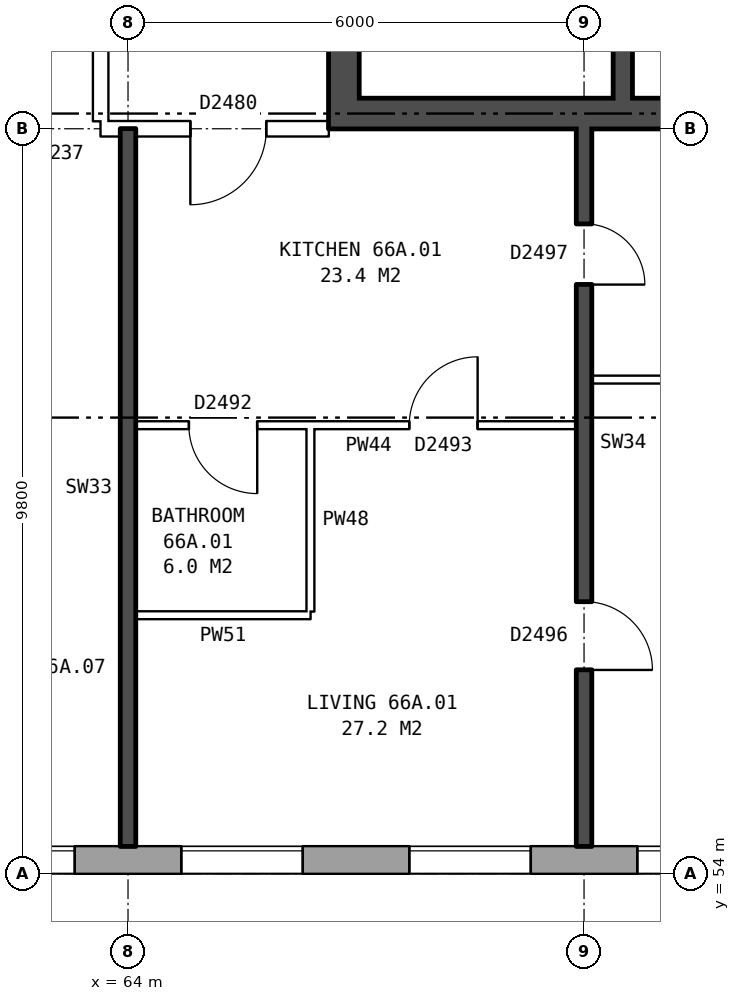
"""IFC4 building model, lengths in metres.
Left out: names, types, materials, properties, quantities, classifications, styles, units other than length and angle.
Written with IfcOpenShell. Run it as: python <this file> out.ifc"""

import sys

from ifc_helpers import new_model, si_unit, direction, frame, frame_2d, origin, place, context, subcontext, project, spatial, rectangle, extrude, element, fill, save


model = new_model("IFC4")
c1 = context("Model", 3, precision=1e-05, world=origin(), true_north=direction((0.0, 1.0)))
c2 = subcontext(c1, "Body", "Model", "MODEL_VIEW")
j1 = project(units=[si_unit("LENGTHUNIT", "METRE"), si_unit("PLANEANGLEUNIT", "RADIAN")], contexts=[c1])
p1 = place(None, origin())
s1 = spatial("IfcSite", under=j1, at=p1, CompositionType="ELEMENT")
p2 = place(p1, origin())
s2 = spatial("IfcBuilding", under=s1, at=p2, CompositionType="ELEMENT")
p3 = place(p2, frame((0.0, 0.0, 233.8)))
s3 = spatial("IfcBuildingStorey", under=s2, at=p3, CompositionType="ELEMENT", Elevation=233.8)
p4 = place(p3, frame((35.075, 54.18, 0.0), z_axis=(0.0, 0.0, 1.0), x_axis=(1.0, 0.0, 0.0)))
e1 = element("IfcWall", 1, at=p4, inside=s3, PredefinedType="STANDARD", context=c2, shape_type="SweptSolid", body=[
    extrude(rectangle(XDim=39.875, YDim=0.36, at=frame_2d((19.938, 0.0))), origin(), (0.0, 0.0, 1.0), 2.85),
])
p5 = place(p4, frame((2.625, 0.0, 0.8)))
e2 = element("IfcOpeningElement", 2, at=p5, cuts=e1, PredefinedType="OPENING", context=c2, shape_type="SweptSolid", body=[
    extrude(rectangle(XDim=1.6, YDim=1.8, at=frame_2d((0.8, 0.9))), frame((0.0, 0.19, 0.0), z_axis=(0.0, -1.0, 0.0), x_axis=(1.0, 0.0, 0.0)), (0.0, 0.0, 1.0), 0.38),
])
p6 = place(p4, frame((5.625, 0.0, 0.8)))
e3 = element("IfcOpeningElement", 3, at=p6, cuts=e1, PredefinedType="OPENING", context=c2, shape_type="SweptSolid", body=[
    extrude(rectangle(XDim=1.6, YDim=1.8, at=frame_2d((0.8, 0.9))), frame((0.0, 0.19, 0.0), z_axis=(0.0, -1.0, 0.0), x_axis=(1.0, 0.0, 0.0)), (0.0, 0.0, 1.0), 0.38),
])
p7 = place(p4, frame((8.625, 0.0, 0.8)))
e4 = element("IfcOpeningElement", 4, at=p7, cuts=e1, PredefinedType="OPENING", context=c2, shape_type="SweptSolid", body=[
    extrude(rectangle(XDim=1.6, YDim=1.8, at=frame_2d((0.8, 0.9))), frame((0.0, 0.19, 0.0), z_axis=(0.0, -1.0, 0.0), x_axis=(1.0, 0.0, 0.0)), (0.0, 0.0, 1.0), 0.38),
])
p8 = place(p4, frame((11.625, 0.0, 0.8)))
e5 = element("IfcOpeningElement", 5, at=p8, cuts=e1, PredefinedType="OPENING", context=c2, shape_type="SweptSolid", body=[
    extrude(rectangle(XDim=1.6, YDim=1.8, at=frame_2d((0.8, 0.9))), frame((0.0, 0.19, 0.0), z_axis=(0.0, -1.0, 0.0), x_axis=(1.0, 0.0, 0.0)), (0.0, 0.0, 1.0), 0.38),
])
p9 = place(p4, frame((14.625, 0.0, 0.8)))
e6 = element("IfcOpeningElement", 6, at=p9, cuts=e1, PredefinedType="OPENING", context=c2, shape_type="SweptSolid", body=[
    extrude(rectangle(XDim=1.6, YDim=1.8, at=frame_2d((0.8, 0.9))), frame((0.0, 0.19, 0.0), z_axis=(0.0, -1.0, 0.0), x_axis=(1.0, 0.0, 0.0)), (0.0, 0.0, 1.0), 0.38),
])
p10 = place(p4, frame((18.475, 0.0, 0.15)))
e7 = element("IfcOpeningElement", 7, at=p10, cuts=e1, PredefinedType="OPENING", context=c2, shape_type="SweptSolid", body=[
    extrude(rectangle(XDim=0.8, YDim=0.9, at=frame_2d((0.4, 0.45))), frame((0.0, 0.19, 0.0), z_axis=(0.0, -1.0, 0.0), x_axis=(1.0, 0.0, 0.0)), (0.0, 0.0, 1.0), 0.38),
])
p11 = place(p4, frame((20.625, 0.0, 0.8)))
e8 = element("IfcOpeningElement", 8, at=p11, cuts=e1, PredefinedType="OPENING", context=c2, shape_type="SweptSolid", body=[
    extrude(rectangle(XDim=1.6, YDim=1.8, at=frame_2d((0.8, 0.9))), frame((0.0, 0.19, 0.0), z_axis=(0.0, -1.0, 0.0), x_axis=(1.0, 0.0, 0.0)), (0.0, 0.0, 1.0), 0.38),
])
p12 = place(p4, frame((23.625, 0.0, 0.8)))
e9 = element("IfcOpeningElement", 9, at=p12, cuts=e1, PredefinedType="OPENING", context=c2, shape_type="SweptSolid", body=[
    extrude(rectangle(XDim=1.6, YDim=1.8, at=frame_2d((0.8, 0.9))), frame((0.0, 0.19, 0.0), z_axis=(0.0, -1.0, 0.0), x_axis=(1.0, 0.0, 0.0)), (0.0, 0.0, 1.0), 0.38),
])
p13 = place(p4, frame((26.625, 0.0, 0.8)))
e10 = element("IfcOpeningElement", 10, at=p13, cuts=e1, PredefinedType="OPENING", context=c2, shape_type="SweptSolid", body=[
    extrude(rectangle(XDim=1.6, YDim=1.8, at=frame_2d((0.8, 0.9))), frame((0.0, 0.19, 0.0), z_axis=(0.0, -1.0, 0.0), x_axis=(1.0, 0.0, 0.0)), (0.0, 0.0, 1.0), 0.38),
])
p14 = place(p4, frame((29.625, 0.0, 0.8)))
e11 = element("IfcOpeningElement", 11, at=p14, cuts=e1, PredefinedType="OPENING", context=c2, shape_type="SweptSolid", body=[
    extrude(rectangle(XDim=1.6, YDim=1.8, at=frame_2d((0.8, 0.9))), frame((0.0, 0.19, 0.0), z_axis=(0.0, -1.0, 0.0), x_axis=(1.0, 0.0, 0.0)), (0.0, 0.0, 1.0), 0.38),
])
p15 = place(p4, frame((32.625, 0.0, 0.8)))
e12 = element("IfcOpeningElement", 12, at=p15, cuts=e1, PredefinedType="OPENING", context=c2, shape_type="SweptSolid", body=[
    extrude(rectangle(XDim=1.6, YDim=1.8, at=frame_2d((0.8, 0.9))), frame((0.0, 0.19, 0.0), z_axis=(0.0, -1.0, 0.0), x_axis=(1.0, 0.0, 0.0)), (0.0, 0.0, 1.0), 0.38),
])
p16 = place(p4, frame((35.625, 0.0, 0.8)))
e13 = element("IfcOpeningElement", 13, at=p16, cuts=e1, PredefinedType="OPENING", context=c2, shape_type="SweptSolid", body=[
    extrude(rectangle(XDim=1.6, YDim=1.8, at=frame_2d((0.8, 0.9))), frame((0.0, 0.19, 0.0), z_axis=(0.0, -1.0, 0.0), x_axis=(1.0, 0.0, 0.0)), (0.0, 0.0, 1.0), 0.38),
])
p17 = place(p3, frame((66.84, 63.8, 0.0), z_axis=(0.0, 0.0, 1.0), x_axis=(0.0, 1.0, 0.0)))
e14 = element("IfcWall", 14, at=p17, inside=s3, PredefinedType="SHEAR", context=c2, shape_type="SweptSolid", body=[
    extrude(rectangle(XDim=12.4, YDim=0.4, at=frame_2d((6.2, 0.0))), origin(), (0.0, 0.0, 1.0), 2.85),
])
p18 = place(p17, frame((1.325, 0.0, 0.0)))
e15 = element("IfcOpeningElement", 15, at=p18, cuts=e14, PredefinedType="OPENING", context=c2, shape_type="SweptSolid", body=[
    extrude(rectangle(XDim=1.1, YDim=2.1, at=frame_2d((0.55, 1.05))), frame((0.0, 0.21, 0.0), z_axis=(0.0, -1.0, 0.0), x_axis=(1.0, 0.0, 0.0)), (0.0, 0.0, 1.0), 0.42),
])
p19 = place(p17, frame((3.6, 0.0, 0.0)))
e16 = element("IfcOpeningElement", 16, at=p19, cuts=e14, PredefinedType="OPENING", context=c2, shape_type="SweptSolid", body=[
    extrude(rectangle(XDim=1.1, YDim=2.1, at=frame_2d((0.55, 1.05))), frame((0.0, 0.21, 0.0), z_axis=(0.0, -1.0, 0.0), x_axis=(1.0, 0.0, 0.0)), (0.0, 0.0, 1.0), 0.42),
])
p20 = place(p17, frame((5.8, 0.0, 0.0)))
e17 = element("IfcOpeningElement", 17, at=p20, cuts=e14, PredefinedType="OPENING", context=c2, shape_type="SweptSolid", body=[
    extrude(rectangle(XDim=1.1, YDim=2.1, at=frame_2d((0.55, 1.05))), frame((0.0, 0.21, 0.0), z_axis=(0.0, -1.0, 0.0), x_axis=(1.0, 0.0, 0.0)), (0.0, 0.0, 1.0), 0.42),
])
p21 = place(p17, frame((8.0, 0.0, 0.0)))
e18 = element("IfcOpeningElement", 18, at=p21, cuts=e14, PredefinedType="OPENING", context=c2, shape_type="SweptSolid", body=[
    extrude(rectangle(XDim=1.1, YDim=2.1, at=frame_2d((0.55, 1.05))), frame((0.0, 0.21, 0.0), z_axis=(0.0, -1.0, 0.0), x_axis=(1.0, 0.0, 0.0)), (0.0, 0.0, 1.0), 0.42),
])
p22 = place(p17, frame((9.9, 0.0, 0.0)))
e19 = element("IfcOpeningElement", 19, at=p22, cuts=e14, PredefinedType="OPENING", context=c2, shape_type="SweptSolid", body=[
    extrude(rectangle(XDim=1.1, YDim=2.1, at=frame_2d((0.55, 1.05))), frame((0.0, 0.21, 0.0), z_axis=(0.0, -1.0, 0.0), x_axis=(1.0, 0.0, 0.0)), (0.0, 0.0, 1.0), 0.42),
])
p23 = place(p3, frame((67.04, 64.0, 0.0), z_axis=(0.0, 0.0, 1.0), x_axis=(1.0, 0.0, 0.0)))
e20 = element("IfcWall", 20, at=p23, inside=s3, PredefinedType="SHEAR", context=c2, shape_type="SweptSolid", body=[
    extrude(rectangle(XDim=8.2, YDim=0.4, at=frame_2d((4.1, 0.0))), origin(), (0.0, 0.0, 1.0), 2.85),
])
p24 = place(p3, frame((70.51, 64.2, 0.0), z_axis=(0.0, 0.0, 1.0), x_axis=(0.0, 1.0, 0.0)))
e21 = element("IfcWall", 21, at=p24, inside=s3, PredefinedType="SHEAR", context=c2, shape_type="SweptSolid", body=[
    extrude(rectangle(XDim=2.525, YDim=0.25, at=frame_2d((1.263, 0.0))), origin(), (0.0, 0.0, 1.0), 2.85),
])
p25 = place(p3, frame((63.64, 63.9, 0.0), z_axis=(0.0, 0.0, 1.0), x_axis=(0.0, 1.0, 0.0)))
e22 = element("IfcWall", 22, at=p25, inside=s3, PredefinedType="PARTITIONING", context=c2, shape_type="SweptSolid", body=[
    extrude(rectangle(XDim=12.2, YDim=0.2, at=frame_2d((6.1, 0.0))), origin(), (0.0, 0.0, 1.0), 2.85),
])
p26 = place(p25, frame((5.1, 0.0, 0.0)))
e23 = element("IfcOpeningElement", 23, at=p26, cuts=e22, PredefinedType="OPENING", context=c2, shape_type="SweptSolid", body=[
    extrude(rectangle(XDim=2.0, YDim=2.1, at=frame_2d((1.0, 1.05))), frame((0.0, 0.11, 0.0), z_axis=(0.0, -1.0, 0.0), x_axis=(1.0, 0.0, 0.0)), (0.0, 0.0, 1.0), 0.22),
])
p27 = place(p3, frame((64.1, 57.4, 0.0), z_axis=(0.0, 0.0, 1.0), x_axis=(1.0, 0.0, 0.0)))
e24 = element("IfcWall", 24, at=p27, inside=s3, PredefinedType="PARTITIONING", context=c2, shape_type="SweptSolid", body=[
    extrude(rectangle(XDim=2.3, YDim=0.1, at=frame_2d((1.15, 0.0))), origin(), (0.0, 0.0, 1.0), 2.85),
])
p28 = place(p3, frame((64.1, 59.9, 0.0), z_axis=(0.0, 0.0, 1.0), x_axis=(1.0, 0.0, 0.0)))
e25 = element("IfcWall", 25, at=p28, inside=s3, PredefinedType="PARTITIONING", context=c2, shape_type="SweptSolid", body=[
    extrude(rectangle(XDim=5.8, YDim=0.1, at=frame_2d((2.9, 0.0))), origin(), (0.0, 0.0, 1.0), 2.85),
])
p29 = place(p28, frame((3.6, 0.0, 0.0)))
e26 = element("IfcOpeningElement", 26, at=p29, cuts=e25, PredefinedType="OPENING", context=c2, shape_type="SweptSolid", body=[
    extrude(rectangle(XDim=0.9, YDim=2.1, at=frame_2d((0.45, 1.05))), frame((0.0, 0.06, 0.0), z_axis=(0.0, -1.0, 0.0), x_axis=(1.0, 0.0, 0.0)), (0.0, 0.0, 1.0), 0.12),
])
p30 = place(p28, frame((0.7, 0.0, 0.0)))
e27 = element("IfcOpeningElement", 27, at=p30, cuts=e25, PredefinedType="OPENING", context=c2, shape_type="SweptSolid", body=[
    extrude(rectangle(XDim=0.9, YDim=2.1, at=frame_2d((0.45, 1.05))), frame((0.0, 0.06, 0.0), z_axis=(0.0, -1.0, 0.0), x_axis=(1.0, 0.0, 0.0)), (0.0, 0.0, 1.0), 0.12),
])
p31 = place(p3, frame((70.1, 60.5, 0.0), z_axis=(0.0, 0.0, 1.0), x_axis=(1.0, 0.0, 0.0)))
e28 = element("IfcWall", 28, at=p31, inside=s3, PredefinedType="PARTITIONING", context=c2, shape_type="SweptSolid", body=[
    extrude(rectangle(XDim=5.8, YDim=0.1, at=frame_2d((2.9, 0.0))), origin(), (0.0, 0.0, 1.0), 2.85),
])
p32 = place(p3, frame((63.64, 63.8, 0.0), z_axis=(0.0, 0.0, 1.0), x_axis=(1.0, 0.0, 0.0)))
e29 = element("IfcWall", 29, at=p32, inside=s3, PredefinedType="PARTITIONING", context=c2, shape_type="SweptSolid", body=[
    extrude(rectangle(XDim=3.0, YDim=0.2, at=frame_2d((1.5, 0.0))), origin(), (0.0, 0.0, 1.0), 2.85),
])
p33 = place(p32, frame((1.18, 0.0, 0.0)))
e30 = element("IfcOpeningElement", 30, at=p33, cuts=e29, PredefinedType="OPENING", context=c2, shape_type="SweptSolid", body=[
    extrude(rectangle(XDim=1.0, YDim=2.1, at=frame_2d((0.5, 1.05))), frame((0.0, 0.11, 0.0), z_axis=(0.0, -1.0, 0.0), x_axis=(1.0, 0.0, 0.0)), (0.0, 0.0, 1.0), 0.22),
])
p34 = place(p3, frame((64.0, 54.36, 0.0), z_axis=(0.0, 0.0, 1.0), x_axis=(0.0, 1.0, 0.0)))
e31 = element("IfcWall", 31, at=p34, inside=s3, PredefinedType="SOLIDWALL", context=c2, shape_type="SweptSolid", body=[
    extrude(rectangle(XDim=9.44, YDim=0.2, at=frame_2d((4.72, 0.0))), origin(), (0.0, 0.0, 1.0), 2.85),
])
p35 = place(p3, frame((66.4, 57.45, 0.0), z_axis=(0.0, 0.0, 1.0), x_axis=(0.0, 1.0, 0.0)))
e32 = element("IfcWall", 32, at=p35, inside=s3, PredefinedType="PARTITIONING", context=c2, shape_type="SweptSolid", body=[
    extrude(rectangle(XDim=2.4, YDim=0.1, at=frame_2d((1.2, 0.0))), origin(), (0.0, 0.0, 1.0), 2.85),
])
p36 = place(p3, frame((70.0, 54.36, 0.0), z_axis=(0.0, 0.0, 1.0), x_axis=(0.0, 1.0, 0.0)))
e33 = element("IfcWall", 33, at=p36, inside=s3, PredefinedType="SOLIDWALL", context=c2, shape_type="SweptSolid", body=[
    extrude(rectangle(XDim=9.44, YDim=0.2, at=frame_2d((4.72, 0.0))), origin(), (0.0, 0.0, 1.0), 2.85),
])
p37 = place(p36, frame((2.32, 0.0, 0.0)))
e34 = element("IfcOpeningElement", 34, at=p37, cuts=e33, PredefinedType="OPENING", context=c2, shape_type="SweptSolid", body=[
    extrude(rectangle(XDim=0.9, YDim=2.1, at=frame_2d((0.45, 1.05))), frame((0.0, 0.11, 0.0), z_axis=(0.0, -1.0, 0.0), x_axis=(1.0, 0.0, 0.0)), (0.0, 0.0, 1.0), 0.22),
])
p38 = place(p36, frame((7.39, 0.0, 0.0)))
e35 = element("IfcOpeningElement", 35, at=p38, cuts=e33, PredefinedType="OPENING", context=c2, shape_type="SweptSolid", body=[
    extrude(rectangle(XDim=0.8, YDim=2.1, at=frame_2d((0.4, 1.05))), frame((0.0, 0.11, 0.0), z_axis=(0.0, -1.0, 0.0), x_axis=(1.0, 0.0, 0.0)), (0.0, 0.0, 1.0), 0.22),
])
p39 = place(p13, origin())
e36 = element("IfcWindow", 36, at=p39, inside=s3, PartitioningType="SINGLE_PANEL", PredefinedType="WINDOW", context=c2, shape_type="SweptSolid", body=[
    extrude(rectangle(XDim=1.6, YDim=1.8, at=frame_2d((0.8, 0.9))), frame((0.0, 0.15, 0.0), z_axis=(0.0, -1.0, 0.0), x_axis=(1.0, 0.0, 0.0)), (0.0, 0.0, 1.0), 0.06),
])
fill(e10, e36)
p40 = place(p14, origin())
e37 = element("IfcWindow", 37, at=p40, inside=s3, PartitioningType="SINGLE_PANEL", PredefinedType="WINDOW", context=c2, shape_type="SweptSolid", body=[
    extrude(rectangle(XDim=1.6, YDim=1.8, at=frame_2d((0.8, 0.9))), frame((0.0, 0.15, 0.0), z_axis=(0.0, -1.0, 0.0), x_axis=(1.0, 0.0, 0.0)), (0.0, 0.0, 1.0), 0.06),
])
fill(e11, e37)
p41 = place(p15, origin())
e38 = element("IfcWindow", 38, at=p41, inside=s3, PartitioningType="SINGLE_PANEL", PredefinedType="WINDOW", context=c2, shape_type="SweptSolid", body=[
    extrude(rectangle(XDim=1.6, YDim=1.8, at=frame_2d((0.8, 0.9))), frame((0.0, 0.15, 0.0), z_axis=(0.0, -1.0, 0.0), x_axis=(1.0, 0.0, 0.0)), (0.0, 0.0, 1.0), 0.06),
])
fill(e12, e38)
p42 = place(p16, origin())
e39 = element("IfcWindow", 39, at=p42, inside=s3, PartitioningType="SINGLE_PANEL", PredefinedType="WINDOW", context=c2, shape_type="SweptSolid", body=[
    extrude(rectangle(XDim=1.6, YDim=1.8, at=frame_2d((0.8, 0.9))), frame((0.0, 0.15, 0.0), z_axis=(0.0, -1.0, 0.0), x_axis=(1.0, 0.0, 0.0)), (0.0, 0.0, 1.0), 0.06),
])
fill(e13, e39)
p43 = place(p37, frame((0.9, 0.0, 0.0), z_axis=(0.0, 0.0, 1.0), x_axis=(-1.0, 0.0, 0.0)))
e40 = element("IfcDoor", 40, at=p43, inside=s3, OperationType="SINGLE_SWING_RIGHT", PredefinedType="DOOR", context=c2, shape_type="SweptSolid", body=[
    extrude(rectangle(XDim=0.9, YDim=2.1, at=frame_2d((0.45, 1.05))), frame((0.0, 0.025, 0.0), z_axis=(0.0, -1.0, 0.0), x_axis=(1.0, 0.0, 0.0)), (0.0, 0.0, 1.0), 0.05),
])
fill(e34, e40)
p44 = place(p33, frame((1.0, 0.0, 0.0), z_axis=(0.0, 0.0, 1.0), x_axis=(-1.0, 0.0, 0.0)))
e41 = element("IfcDoor", 41, at=p44, inside=s3, OperationType="SINGLE_SWING_RIGHT", PredefinedType="DOOR", context=c2, shape_type="SweptSolid", body=[
    extrude(rectangle(XDim=1.0, YDim=2.1, at=frame_2d((0.5, 1.05))), frame((0.0, 0.025, 0.0), z_axis=(0.0, -1.0, 0.0), x_axis=(1.0, 0.0, 0.0)), (0.0, 0.0, 1.0), 0.05),
])
fill(e30, e41)
p45 = place(p29, origin())
e42 = element("IfcDoor", 42, at=p45, inside=s3, OperationType="SINGLE_SWING_RIGHT", PredefinedType="DOOR", context=c2, shape_type="SweptSolid", body=[
    extrude(rectangle(XDim=0.9, YDim=2.1, at=frame_2d((0.45, 1.05))), frame((0.0, 0.025, 0.0), z_axis=(0.0, -1.0, 0.0), x_axis=(1.0, 0.0, 0.0)), (0.0, 0.0, 1.0), 0.05),
])
fill(e26, e42)
p46 = place(p38, frame((0.8, 0.0, 0.0), z_axis=(0.0, 0.0, 1.0), x_axis=(-1.0, 0.0, 0.0)))
e43 = element("IfcDoor", 43, at=p46, inside=s3, OperationType="SINGLE_SWING_RIGHT", PredefinedType="DOOR", context=c2, shape_type="SweptSolid", body=[
    extrude(rectangle(XDim=0.8, YDim=2.1, at=frame_2d((0.4, 1.05))), frame((0.0, 0.025, 0.0), z_axis=(0.0, -1.0, 0.0), x_axis=(1.0, 0.0, 0.0)), (0.0, 0.0, 1.0), 0.05),
])
fill(e35, e43)
p47 = place(p30, frame((0.9, 0.0, 0.0), z_axis=(0.0, 0.0, 1.0), x_axis=(-1.0, 0.0, 0.0)))
e44 = element("IfcDoor", 44, at=p47, inside=s3, OperationType="SINGLE_SWING_LEFT", PredefinedType="DOOR", context=c2, shape_type="SweptSolid", body=[
    extrude(rectangle(XDim=0.9, YDim=2.1, at=frame_2d((0.45, 1.05))), frame((0.0, 0.025, 0.0), z_axis=(0.0, -1.0, 0.0), x_axis=(1.0, 0.0, 0.0)), (0.0, 0.0, 1.0), 0.05),
])
fill(e27, e44)
save(model, sys.argv[1])
